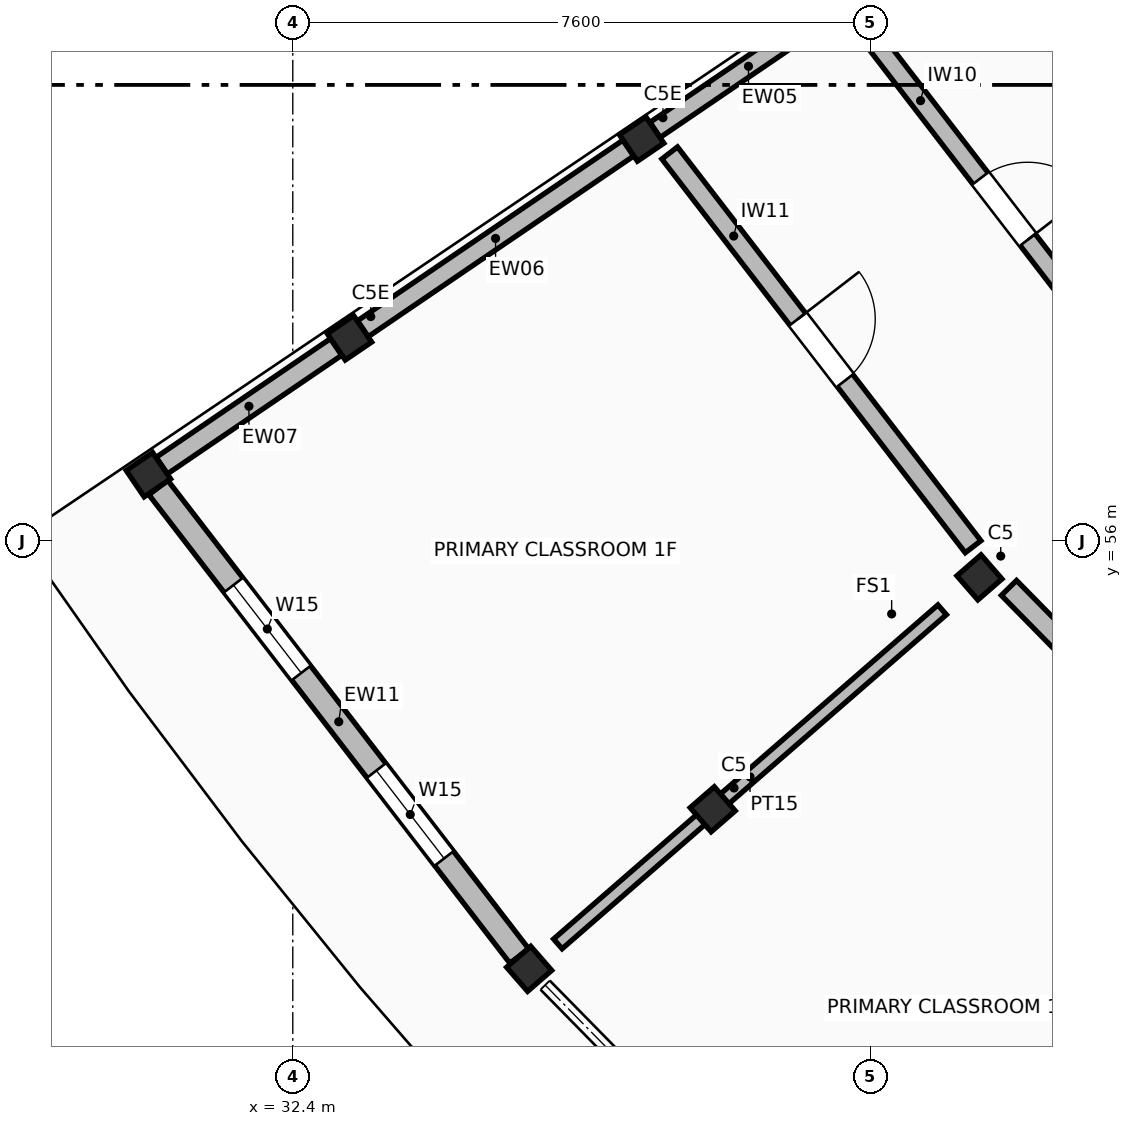
"""IFC4 building model, lengths in metres.
Left out: names, types, materials, properties, quantities, classifications, styles, units other than length and angle.
Written with IfcOpenShell. Run it as: python <this file> out.ifc"""

import sys

from ifc_helpers import new_model, si_unit, direction, frame, frame_2d, origin, origin_2d, place, context, subcontext, project, spatial, rectangle, extrude, element, fill, save


model = new_model("IFC4")
c1 = context("Model", 3, precision=1e-05, world=origin(), true_north=direction((0.0, 1.0)))
c2 = subcontext(c1, "Body", "Model", "MODEL_VIEW")
j1 = project(units=[si_unit("LENGTHUNIT", "METRE"), si_unit("PLANEANGLEUNIT", "RADIAN")], contexts=[c1])
p1 = place(None, origin())
s1 = spatial("IfcSite", under=j1, at=p1, CompositionType="ELEMENT")
p2 = place(p1, origin())
s2 = spatial("IfcBuilding", under=s1, at=p2, CompositionType="ELEMENT")
p3 = place(p2, origin())
s3 = spatial("IfcBuildingStorey", under=s2, at=p3, CompositionType="ELEMENT", Elevation=0.0)
for number, where, z_axis, x_axis in (
    (1, (36.99, 61.288, 0.0), (0.0, 0.0, 1.0), (-0.827, -0.563, 0.0)),
    (2, (33.146, 58.672, 0.0), (0.0, 0.0, 1.0), (-0.827, -0.563, 0.0)),
    (3, (30.5, 56.872, 0.0), (0.0, 0.0, 1.0), (-0.827, -0.563, 0.0)),
    (4, (41.434, 55.521, 0.0), (0.0, 0.0, 1.0), (-0.755, -0.656, 0.0)),
    (5, (37.925, 52.47, 0.0), (0.0, 0.0, 1.0), (-0.755, -0.656, 0.0)),
    (6, (35.51, 50.371, 0.0), (0.0, 0.0, 1.0), (-0.755, -0.656, 0.0)),
):
    element("IfcColumn", number, at=place(p3, frame(where, z_axis=z_axis, x_axis=x_axis)), inside=s3, PredefinedType="COLUMN", context=c2, shape_type="SweptSolid", body=[
        extrude(rectangle(XDim=0.42, YDim=0.42, at=origin_2d()), origin(), (0.0, 0.0, 1.0), 4.42),
    ])
p4 = place(p3, frame((30.63, 56.703, 0.0), z_axis=(0.0, 0.0, 1.0), x_axis=(0.610380744175, -0.792108166313, 0.0)))
e7 = element("IfcWall", 7, at=p4, inside=s3, PredefinedType="STANDARD", context=c2, shape_type="SweptSolid", body=[
    extrude(rectangle(XDim=7.781, YDim=0.312, at=frame_2d((3.891, 0.0))), origin(), (0.0, 0.0, 1.0), 3.4),
])
p5 = place(p4, frame((1.62, 0.0, 0.95)))
e8 = element("IfcOpeningElement", 8, at=p5, cuts=e7, PredefinedType="OPENING", context=c2, shape_type="SweptSolid", body=[
    extrude(rectangle(XDim=1.46, YDim=1.45, at=frame_2d((0.73, 0.725))), frame((0.0, 0.166, 0.0), z_axis=(0.0, -1.0, 0.0), x_axis=(1.0, 0.0, 0.0)), (0.0, 0.0, 1.0), 0.332),
])
p6 = place(p4, frame((4.701, 0.0, 0.95)))
e9 = element("IfcOpeningElement", 9, at=p6, cuts=e7, PredefinedType="OPENING", context=c2, shape_type="SweptSolid", body=[
    extrude(rectangle(XDim=1.46, YDim=1.45, at=frame_2d((0.73, 0.725))), frame((0.0, 0.166, 0.0), z_axis=(0.0, -1.0, 0.0), x_axis=(1.0, 0.0, 0.0)), (0.0, 0.0, 1.0), 0.332),
])
p7 = place(p3, frame((39.625, 63.081, 0.0), z_axis=(0.0, 0.0, 1.0), x_axis=(-0.826746288828, -0.562574949592, 0.0)))
e10 = element("IfcWall", 10, at=p7, inside=s3, PredefinedType="STANDARD", context=c2, shape_type="SweptSolid", body=[
    extrude(rectangle(XDim=2.974, YDim=0.24, at=frame_2d((1.487, 0.0))), origin(), (0.0, 0.0, 1.0), 3.4),
])
p8 = place(p3, frame((36.814, 61.169, 0.0), z_axis=(0.0, 0.0, 1.0), x_axis=(-0.826730801619, -0.56259770854, 0.0)))
e11 = element("IfcWall", 11, at=p8, inside=s3, PredefinedType="STANDARD", context=c2, shape_type="SweptSolid", body=[
    extrude(rectangle(XDim=4.224, YDim=0.252, at=frame_2d((2.112, 0.0))), origin(), (0.0, 0.0, 1.0), 3.4),
])
p9 = place(p3, frame((32.97, 58.552, 0.0), z_axis=(0.0, 0.0, 1.0), x_axis=(-0.826731643037, -0.562596472085, 0.0)))
e12 = element("IfcWall", 12, at=p9, inside=s3, PredefinedType="STANDARD", context=c2, shape_type="SweptSolid", body=[
    extrude(rectangle(XDim=2.774, YDim=0.264, at=frame_2d((1.387, 0.0))), origin(), (0.0, 0.0, 1.0), 3.4),
])
p10 = place(p3, frame((39.872, 62.815, 0.0), z_axis=(0.0, 0.0, 1.0), x_axis=(0.610376740954, -0.79211125109, 0.0)))
e13 = element("IfcWall", 13, at=p10, inside=s3, PredefinedType="STANDARD", context=c2, shape_type="SweptSolid", body=[
    extrude(rectangle(XDim=6.181, YDim=0.25, at=frame_2d((3.09, 0.0))), origin(), (0.0, 0.0, 1.0), 3.38),
])
p11 = place(p10, frame((2.581, 0.0, 0.0)))
e14 = element("IfcOpeningElement", 14, at=p11, cuts=e13, PredefinedType="OPENING", context=c2, shape_type="SweptSolid", body=[
    extrude(rectangle(XDim=1.02, YDim=2.12, at=frame_2d((0.51, 1.06))), frame((0.0, 0.135, 0.0), z_axis=(0.0, -1.0, 0.0), x_axis=(1.0, 0.0, 0.0)), (0.0, 0.0, 1.0), 0.27),
])
p12 = place(p3, frame((37.359, 61.104, 0.0), z_axis=(0.0, 0.0, 1.0), x_axis=(0.610378079511, -0.792110219637, 0.0)))
e15 = element("IfcWall", 15, at=p12, inside=s3, PredefinedType="STANDARD", context=c2, shape_type="SweptSolid", body=[
    extrude(rectangle(XDim=6.54, YDim=0.26, at=frame_2d((3.27, 0.0))), origin(), (0.0, 0.0, 1.0), 3.38),
])
p13 = place(p12, frame((2.76, 0.0, 0.0)))
e16 = element("IfcOpeningElement", 16, at=p13, cuts=e15, PredefinedType="OPENING", context=c2, shape_type="SweptSolid", body=[
    extrude(rectangle(XDim=1.02, YDim=2.18, at=frame_2d((0.51, 1.09))), frame((0.0, 0.14, 0.0), z_axis=(0.0, -1.0, 0.0), x_axis=(1.0, 0.0, 0.0)), (0.0, 0.0, 1.0), 0.28),
])
p14 = place(p3, frame((41.823, 55.383, 0.0), z_axis=(0.0, 0.0, 1.0), x_axis=(0.700914816473, -0.713244993006, 0.0)))
e17 = element("IfcWall", 17, at=p14, inside=s3, PredefinedType="STANDARD", context=c2, shape_type="SweptSolid", body=[
    extrude(rectangle(XDim=6.792, YDim=0.28, at=frame_2d((3.396, 0.0))), origin(), (0.0, 0.0, 1.0), 3.38),
])
p15 = place(p14, frame((2.966, 0.0, 0.0)))
e18 = element("IfcOpeningElement", 18, at=p15, cuts=e17, PredefinedType="OPENING", context=c2, shape_type="SweptSolid", body=[
    extrude(rectangle(XDim=0.86, YDim=2.06, at=frame_2d((0.43, 1.03))), frame((0.0, 0.15, 0.0), z_axis=(0.0, -1.0, 0.0), x_axis=(1.0, 0.0, 0.0)), (0.0, 0.0, 1.0), 0.3),
])
p16 = place(p3, frame((40.944, 55.095, 0.0), z_axis=(0.0, 0.0, 1.0), x_axis=(-0.754721612631, -0.656045187032, 0.0)))
e19 = element("IfcWall", 19, at=p16, inside=s3, PredefinedType="PARTITIONING", context=c2, shape_type="SweptSolid", body=[
    extrude(rectangle(XDim=6.7, YDim=0.17, at=frame_2d((3.35, 0.0))), origin(), (0.0, 0.0, 1.0), 3.38),
])
p17 = place(p5, origin())
e20 = element("IfcWindow", 20, at=p17, inside=s3, PartitioningType="SINGLE_PANEL", PredefinedType="WINDOW", context=c2, shape_type="SweptSolid", body=[
    extrude(rectangle(XDim=1.46, YDim=1.45, at=frame_2d((0.73, 0.725))), frame((0.0, 0.03, 0.0), z_axis=(0.0, -1.0, 0.0), x_axis=(1.0, 0.0, 0.0)), (0.0, 0.0, 1.0), 0.06),
])
fill(e8, e20)
p18 = place(p6, origin())
e21 = element("IfcWindow", 21, at=p18, inside=s3, PartitioningType="SINGLE_PANEL", PredefinedType="WINDOW", context=c2, shape_type="SweptSolid", body=[
    extrude(rectangle(XDim=1.46, YDim=1.45, at=frame_2d((0.73, 0.725))), frame((0.0, 0.03, 0.0), z_axis=(0.0, -1.0, 0.0), x_axis=(1.0, 0.0, 0.0)), (0.0, 0.0, 1.0), 0.06),
])
fill(e9, e21)
p19 = place(p11, frame((1.02, 0.0, 0.0), z_axis=(0.0, 0.0, 1.0), x_axis=(-1.0, 0.0, 0.0)))
e22 = element("IfcDoor", 22, at=p19, inside=s3, OperationType="SINGLE_SWING_RIGHT", PredefinedType="DOOR", context=c2, shape_type="SweptSolid", body=[
    extrude(rectangle(XDim=1.02, YDim=2.12, at=frame_2d((0.51, 1.06))), frame((0.0, 0.025, 0.0), z_axis=(0.0, -1.0, 0.0), x_axis=(1.0, 0.0, 0.0)), (0.0, 0.0, 1.0), 0.05),
])
fill(e14, e22)
p20 = place(p13, origin())
e23 = element("IfcDoor", 23, at=p20, inside=s3, OperationType="SINGLE_SWING_LEFT", PredefinedType="DOOR", context=c2, shape_type="SweptSolid", body=[
    extrude(rectangle(XDim=1.02, YDim=2.18, at=frame_2d((0.51, 1.09))), frame((0.0, 0.025, 0.0), z_axis=(0.0, -1.0, 0.0), x_axis=(1.0, 0.0, 0.0)), (0.0, 0.0, 1.0), 0.05),
])
fill(e16, e23)
save(model, sys.argv[1])
